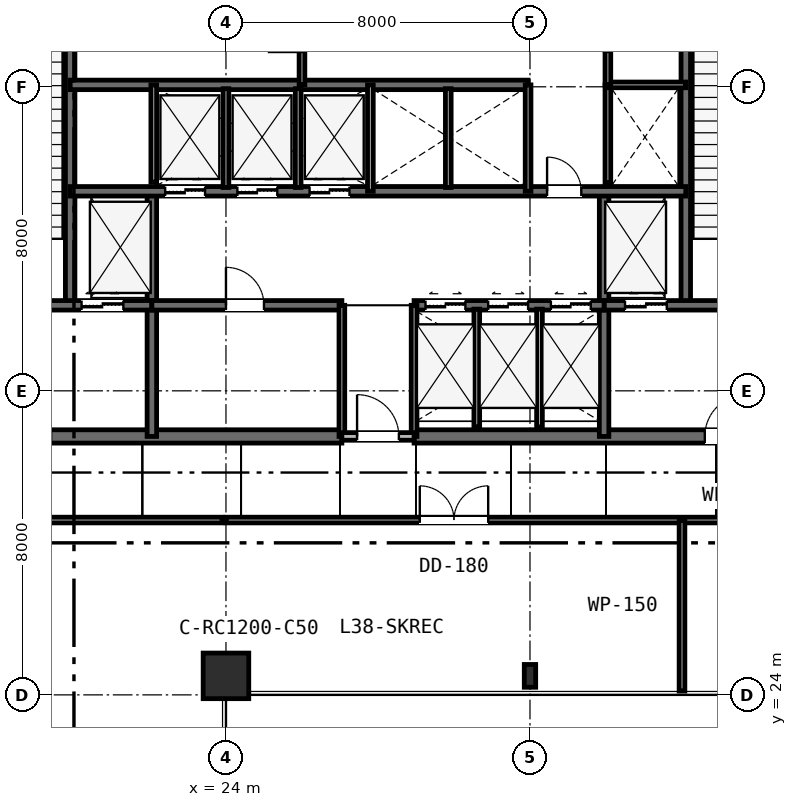
"""IFC4 building model, lengths in metres.
Left out: names, types, materials, properties, quantities, classifications, styles, units other than length and angle.
Written with IfcOpenShell. Run it as: python <this file> out.ifc"""

import sys

from ifc_helpers import new_model, si_unit, direction, frame, frame_2d, origin, origin_2d, place, context, subcontext, project, spatial, rectangle, i_section, extrude, element, fill, save


model = new_model("IFC4")
c1 = context("Model", 3, precision=1e-05, world=origin(), true_north=direction((0.0, 1.0)))
c2 = subcontext(c1, "Body", "Model", "MODEL_VIEW")
j1 = project(units=[si_unit("LENGTHUNIT", "METRE"), si_unit("PLANEANGLEUNIT", "RADIAN")], contexts=[c1])
p1 = place(None, origin())
s1 = spatial("IfcSite", under=j1, at=p1, CompositionType="ELEMENT")
p2 = place(p1, origin())
s2 = spatial("IfcBuilding", under=s1, at=p2, CompositionType="ELEMENT")
p3 = place(p2, frame((0.0, 0.0, 148.8)))
s3 = spatial("IfcBuildingStorey", under=s2, at=p3, CompositionType="ELEMENT", Elevation=148.8)
p4 = place(p3, frame((15.85, 30.8, 0.0), z_axis=(0.0, 0.0, 1.0), x_axis=(1.0, 0.0, 0.0)))
e1 = element("IfcWall", 1, at=p4, inside=s3, PredefinedType="SHEAR", context=c2, shape_type="SweptSolid", body=[
    extrude(rectangle(XDim=11.2, YDim=0.35, at=frame_2d((5.6, 0.0))), origin(), (0.0, 0.0, 1.0), 5.4),
])
p5 = place(p4, frame((2.45, 0.0, 0.0)))
e2 = element("IfcOpeningElement", 2, at=p5, cuts=e1, PredefinedType="OPENING", context=c2, shape_type="SweptSolid", body=[
    extrude(rectangle(XDim=1.1, YDim=2.15, at=frame_2d((0.55, 1.075))), frame((0.0, 0.185, 0.0), z_axis=(0.0, -1.0, 0.0), x_axis=(1.0, 0.0, 0.0)), (0.0, 0.0, 1.0), 0.37),
])
p6 = place(p3, frame((28.95, 30.8, 0.0), z_axis=(0.0, 0.0, 1.0), x_axis=(1.0, 0.0, 0.0)))
e3 = element("IfcWall", 3, at=p6, inside=s3, PredefinedType="SHEAR", context=c2, shape_type="SweptSolid", body=[
    extrude(rectangle(XDim=11.2, YDim=0.35, at=frame_2d((5.6, 0.0))), origin(), (0.0, 0.0, 1.0), 5.4),
])
p7 = place(p6, frame((7.65, 0.0, 0.0)))
e4 = element("IfcOpeningElement", 4, at=p7, cuts=e3, PredefinedType="OPENING", context=c2, shape_type="SweptSolid", body=[
    extrude(rectangle(XDim=1.1, YDim=2.15, at=frame_2d((0.55, 1.075))), frame((0.0, 0.185, 0.0), z_axis=(0.0, -1.0, 0.0), x_axis=(1.0, 0.0, 0.0)), (0.0, 0.0, 1.0), 0.37),
])
for number, where, z_axis, x_axis in (
    (5, (19.9, 34.25, 0.0), (0.0, 0.0, 1.0), (0.0, 1.0, 0.0)),
    (6, (36.1, 34.25, 0.0), (0.0, 0.0, 1.0), (0.0, 1.0, 0.0)),
):
    element("IfcWall", number, at=place(p3, frame(where, z_axis=z_axis, x_axis=x_axis)), inside=s3, PredefinedType="SHEAR", context=c2, shape_type="SweptSolid", body=[
        extrude(rectangle(XDim=8.65, YDim=0.25, at=frame_2d((4.325, 0.0))), origin(), (0.0, 0.0, 1.0), 5.4),
    ])
for number, where, z_axis, x_axis in (
    (7, (22.05, 30.8, 0.0), (0.0, 0.0, 1.0), (0.0, 1.0, 0.0)),
    (8, (33.95, 30.8, 0.0), (0.0, 0.0, 1.0), (0.0, 1.0, 0.0)),
):
    element("IfcWall", number, at=place(p3, frame(where, z_axis=z_axis, x_axis=x_axis)), inside=s3, PredefinedType="SHEAR", context=c2, shape_type="SweptSolid", body=[
        extrude(rectangle(XDim=6.45, YDim=0.25, at=frame_2d((3.225, 0.0))), origin(), (0.0, 0.0, 1.0), 5.4),
    ])
p8 = place(p3, frame((16.0, 34.25, 0.0), z_axis=(0.0, 0.0, 1.0), x_axis=(1.0, 0.0, 0.0)))
e9 = element("IfcWall", 9, at=p8, inside=s3, PredefinedType="SHEAR", context=c2, shape_type="SweptSolid", body=[
    extrude(rectangle(XDim=6.05, YDim=0.25, at=frame_2d((3.025, 0.0))), origin(), (0.0, 0.0, 1.0), 5.4),
])
p9 = place(p8, frame((1.25, 0.0, 0.0)))
e10 = element("IfcOpeningElement", 10, at=p9, cuts=e9, PredefinedType="OPENING", context=c2, shape_type="SweptSolid", body=[
    extrude(rectangle(XDim=1.0, YDim=2.15, at=frame_2d((0.5, 1.075))), frame((0.0, 0.135, 0.0), z_axis=(0.0, -1.0, 0.0), x_axis=(1.0, 0.0, 0.0)), (0.0, 0.0, 1.0), 0.27),
])
p10 = place(p8, frame((4.2, 0.0, 0.0)))
e11 = element("IfcOpeningElement", 11, at=p10, cuts=e9, PredefinedType="OPENING", context=c2, shape_type="SweptSolid", body=[
    extrude(rectangle(XDim=1.1, YDim=2.15, at=frame_2d((0.55, 1.075))), frame((0.0, 0.135, 0.0), z_axis=(0.0, -1.0, 0.0), x_axis=(1.0, 0.0, 0.0)), (0.0, 0.0, 1.0), 0.27),
])
p11 = place(p3, frame((33.95, 34.25, 0.0), z_axis=(0.0, 0.0, 1.0), x_axis=(1.0, 0.0, 0.0)))
e12 = element("IfcWall", 12, at=p11, inside=s3, PredefinedType="SHEAR", context=c2, shape_type="SweptSolid", body=[
    extrude(rectangle(XDim=6.05, YDim=0.25, at=frame_2d((3.025, 0.0))), origin(), (0.0, 0.0, 1.0), 5.4),
])
p12 = place(p11, frame((3.7, 0.0, 0.0)))
e13 = element("IfcOpeningElement", 13, at=p12, cuts=e12, PredefinedType="OPENING", context=c2, shape_type="SweptSolid", body=[
    extrude(rectangle(XDim=1.0, YDim=2.15, at=frame_2d((0.5, 1.075))), frame((0.0, 0.135, 0.0), z_axis=(0.0, -1.0, 0.0), x_axis=(1.0, 0.0, 0.0)), (0.0, 0.0, 1.0), 0.27),
])
p13 = place(p11, frame((0.55, 0.0, 0.0)))
e14 = element("IfcOpeningElement", 14, at=p13, cuts=e12, PredefinedType="OPENING", context=c2, shape_type="SweptSolid", body=[
    extrude(rectangle(XDim=1.1, YDim=2.15, at=frame_2d((0.55, 1.075))), frame((0.0, 0.135, 0.0), z_axis=(0.0, -1.0, 0.0), x_axis=(1.0, 0.0, 0.0)), (0.0, 0.0, 1.0), 0.27),
])
p14 = place(p3, frame((22.05, 34.25, 0.0), z_axis=(0.0, 0.0, 1.0), x_axis=(1.0, 0.0, 0.0)))
e15 = element("IfcWall", 15, at=p14, inside=s3, PredefinedType="SHEAR", context=c2, shape_type="SweptSolid", body=[
    extrude(rectangle(XDim=5.0, YDim=0.25, at=frame_2d((2.5, 0.0))), origin(), (0.0, 0.0, 1.0), 5.4),
])
p15 = place(p14, frame((1.95, 0.0, 0.0)))
e16 = element("IfcOpeningElement", 16, at=p15, cuts=e15, PredefinedType="OPENING", context=c2, shape_type="SweptSolid", body=[
    extrude(rectangle(XDim=1.0, YDim=2.15, at=frame_2d((0.5, 1.075))), frame((0.0, 0.135, 0.0), z_axis=(0.0, -1.0, 0.0), x_axis=(1.0, 0.0, 0.0)), (0.0, 0.0, 1.0), 0.27),
])
p16 = place(p3, frame((28.95, 34.25, 0.0), z_axis=(0.0, 0.0, 1.0), x_axis=(1.0, 0.0, 0.0)))
e17 = element("IfcWall", 17, at=p16, inside=s3, PredefinedType="SHEAR", context=c2, shape_type="SweptSolid", body=[
    extrude(rectangle(XDim=5.0, YDim=0.25, at=frame_2d((2.5, 0.0))), origin(), (0.0, 0.0, 1.0), 5.4),
])
p17 = place(p16, frame((0.3, 0.0, 0.0)))
e18 = element("IfcOpeningElement", 18, at=p17, cuts=e17, PredefinedType="OPENING", context=c2, shape_type="SweptSolid", body=[
    extrude(rectangle(XDim=1.05, YDim=2.15, at=frame_2d((0.525, 1.075))), frame((0.0, 0.135, 0.0), z_axis=(0.0, -1.0, 0.0), x_axis=(1.0, 0.0, 0.0)), (0.0, 0.0, 1.0), 0.27),
])
p18 = place(p16, frame((1.95, 0.0, 0.0)))
e19 = element("IfcOpeningElement", 19, at=p18, cuts=e17, PredefinedType="OPENING", context=c2, shape_type="SweptSolid", body=[
    extrude(rectangle(XDim=1.05, YDim=2.15, at=frame_2d((0.525, 1.075))), frame((0.0, 0.135, 0.0), z_axis=(0.0, -1.0, 0.0), x_axis=(1.0, 0.0, 0.0)), (0.0, 0.0, 1.0), 0.27),
])
p19 = place(p16, frame((3.6, 0.0, 0.0)))
e20 = element("IfcOpeningElement", 20, at=p19, cuts=e17, PredefinedType="OPENING", context=c2, shape_type="SweptSolid", body=[
    extrude(rectangle(XDim=1.05, YDim=2.15, at=frame_2d((0.525, 1.075))), frame((0.0, 0.135, 0.0), z_axis=(0.0, -1.0, 0.0), x_axis=(1.0, 0.0, 0.0)), (0.0, 0.0, 1.0), 0.27),
])
p20 = place(p3, frame((19.9, 37.25, 0.0), z_axis=(0.0, 0.0, 1.0), x_axis=(1.0, 0.0, 0.0)))
e21 = element("IfcWall", 21, at=p20, inside=s3, PredefinedType="SHEAR", context=c2, shape_type="SweptSolid", body=[
    extrude(rectangle(XDim=16.2, YDim=0.25, at=frame_2d((8.1, 0.0))), origin(), (0.0, 0.0, 1.0), 5.4),
])
p21 = place(p20, frame((12.55, 0.0, 0.0)))
e22 = element("IfcOpeningElement", 22, at=p21, cuts=e21, PredefinedType="OPENING", context=c2, shape_type="SweptSolid", body=[
    extrude(rectangle(XDim=0.9, YDim=2.15, at=frame_2d((0.45, 1.075))), frame((0.0, 0.135, 0.0), z_axis=(0.0, -1.0, 0.0), x_axis=(1.0, 0.0, 0.0)), (0.0, 0.0, 1.0), 0.27),
])
p22 = place(p20, frame((2.5, 0.0, 0.0)))
e23 = element("IfcOpeningElement", 23, at=p22, cuts=e21, PredefinedType="OPENING", context=c2, shape_type="SweptSolid", body=[
    extrude(rectangle(XDim=1.05, YDim=2.15, at=frame_2d((0.525, 1.075))), frame((0.0, 0.135, 0.0), z_axis=(0.0, -1.0, 0.0), x_axis=(1.0, 0.0, 0.0)), (0.0, 0.0, 1.0), 0.27),
])
p23 = place(p20, frame((4.4, 0.0, 0.0)))
e24 = element("IfcOpeningElement", 24, at=p23, cuts=e21, PredefinedType="OPENING", context=c2, shape_type="SweptSolid", body=[
    extrude(rectangle(XDim=1.05, YDim=2.15, at=frame_2d((0.525, 1.075))), frame((0.0, 0.135, 0.0), z_axis=(0.0, -1.0, 0.0), x_axis=(1.0, 0.0, 0.0)), (0.0, 0.0, 1.0), 0.27),
])
p24 = place(p20, frame((6.3, 0.0, 0.0)))
e25 = element("IfcOpeningElement", 25, at=p24, cuts=e21, PredefinedType="OPENING", context=c2, shape_type="SweptSolid", body=[
    extrude(rectangle(XDim=1.05, YDim=2.15, at=frame_2d((0.525, 1.075))), frame((0.0, 0.135, 0.0), z_axis=(0.0, -1.0, 0.0), x_axis=(1.0, 0.0, 0.0)), (0.0, 0.0, 1.0), 0.27),
])
p25 = place(p3, frame((19.9, 40.05, 0.0), z_axis=(0.0, 0.0, 1.0), x_axis=(1.0, 0.0, 0.0)))
e26 = element("IfcWall", 26, at=p25, inside=s3, PredefinedType="SHEAR", context=c2, shape_type="SweptSolid", body=[
    extrude(rectangle(XDim=12.05, YDim=0.25, at=frame_2d((6.025, 0.0))), origin(), (0.0, 0.0, 1.0), 5.4),
])
p26 = place(p3, frame((24.0, 24.5, 0.0), z_axis=(0.0, 0.0, 1.0), x_axis=(1.0, 0.0, 0.0)))
e27 = element("IfcColumn", 27, at=p26, inside=s3, PredefinedType="COLUMN", context=c2, shape_type="SweptSolid", body=[
    extrude(rectangle(XDim=1.2, YDim=1.2, at=origin_2d()), origin(), (0.0, 0.0, 1.0), 5.4),
])
p27 = place(p3, frame((32.0, 24.5, 0.0), z_axis=(0.0, 0.0, 1.0), x_axis=(1.0, 0.0, 0.0)))
e28 = element("IfcColumn", 28, at=p27, inside=s3, PredefinedType="COLUMN", context=c2, shape_type="SweptSolid", body=[
    extrude(i_section(OverallWidth=0.3, OverallDepth=0.6, WebThickness=0.015, FlangeThickness=0.03, FilletRadius=0.027, at=origin_2d()), origin(), (0.0, 0.0, 1.0), 5.4),
])
p28 = place(p3, frame((27.05, 30.8, 0.0), z_axis=(0.0, 0.0, 1.0), x_axis=(0.0, 1.0, 0.0)))
e29 = element("IfcWall", 29, at=p28, inside=s3, PredefinedType="PLUMBINGWALL", context=c2, shape_type="SweptSolid", body=[
    extrude(rectangle(XDim=3.45, YDim=0.15, at=frame_2d((1.725, 0.0))), origin(), (0.0, 0.0, 1.0), 4.76),
])
p29 = place(p3, frame((28.95, 30.8, 0.0), z_axis=(0.0, 0.0, 1.0), x_axis=(0.0, 1.0, 0.0)))
e30 = element("IfcWall", 30, at=p29, inside=s3, PredefinedType="PLUMBINGWALL", context=c2, shape_type="SweptSolid", body=[
    extrude(rectangle(XDim=3.45, YDim=0.15, at=frame_2d((1.725, 0.0))), origin(), (0.0, 0.0, 1.0), 5.13),
])
p30 = place(p3, frame((27.05, 30.8, 0.0), z_axis=(0.0, 0.0, 1.0), x_axis=(1.0, 0.0, 0.0)))
e31 = element("IfcWall", 31, at=p30, inside=s3, PredefinedType="PARTITIONING", context=c2, shape_type="SweptSolid", body=[
    extrude(rectangle(XDim=1.9, YDim=0.2, at=frame_2d((0.95, 0.0))), origin(), (0.0, 0.0, 1.0), 4.76),
])
p31 = place(p30, frame((0.4, 0.0, 0.0)))
e32 = element("IfcOpeningElement", 32, at=p31, cuts=e31, PredefinedType="OPENING", context=c2, shape_type="SweptSolid", body=[
    extrude(rectangle(XDim=1.1, YDim=2.15, at=frame_2d((0.55, 1.075))), frame((0.0, 0.11, 0.0), z_axis=(0.0, -1.0, 0.0), x_axis=(1.0, 0.0, 0.0)), (0.0, 0.0, 1.0), 0.22),
])
for number, where, z_axis, x_axis in (
    (33, (30.6, 31.05, 0.0), (0.0, 0.0, 1.0), (0.0, 1.0, 0.0)),
    (34, (32.25, 31.05, 0.0), (0.0, 0.0, 1.0), (0.0, 1.0, 0.0)),
):
    element("IfcWall", number, at=place(p3, frame(where, z_axis=z_axis, x_axis=x_axis)), inside=s3, PredefinedType="PLUMBINGWALL", context=c2, shape_type="SweptSolid", body=[
        extrude(rectangle(XDim=3.1, YDim=0.15, at=frame_2d((1.55, 0.0))), origin(), (0.0, 0.0, 1.0), 5.13),
    ])
p32 = place(p3, frame((22.1, 37.49, 0.0), z_axis=(0.0, 0.0, 1.0), x_axis=(0.0, 1.0, 0.0)))
e35 = element("IfcWall", 35, at=p32, inside=s3, PredefinedType="PLUMBINGWALL", context=c2, shape_type="SweptSolid", body=[
    extrude(rectangle(XDim=2.56, YDim=0.15, at=frame_2d((1.28, 0.0))), origin(), (0.0, 0.0, 1.0), 5.13),
])
p33 = place(p3, frame((27.8, 37.25, 0.0), z_axis=(0.0, 0.0, 1.0), x_axis=(0.0, 1.0, 0.0)))
e36 = element("IfcWall", 36, at=p33, inside=s3, PredefinedType="PLUMBINGWALL", context=c2, shape_type="SweptSolid", body=[
    extrude(rectangle(XDim=2.8, YDim=0.15, at=frame_2d((1.4, 0.0))), origin(), (0.0, 0.0, 1.0), 5.13),
])
for number, where, z_axis, x_axis in (
    (37, (24.0, 37.35, 0.0), (0.0, 0.0, 1.0), (0.0, 1.0, 0.0)),
    (38, (25.9, 37.35, 0.0), (0.0, 0.0, 1.0), (0.0, 1.0, 0.0)),
):
    element("IfcWall", number, at=place(p3, frame(where, z_axis=z_axis, x_axis=x_axis)), inside=s3, PredefinedType="PLUMBINGWALL", context=c2, shape_type="SweptSolid", body=[
        extrude(rectangle(XDim=2.6, YDim=0.15, at=frame_2d((1.3, 0.0))), origin(), (0.0, 0.0, 1.0), 5.13),
    ])
p34 = place(p3, frame((31.95, 37.25, 0.0), z_axis=(0.0, 0.0, 1.0), x_axis=(0.0, 1.0, 0.0)))
e39 = element("IfcWall", 39, at=p34, inside=s3, PredefinedType="PLUMBINGWALL", context=c2, shape_type="SweptSolid", body=[
    extrude(rectangle(XDim=2.8, YDim=0.15, at=frame_2d((1.4, 0.0))), origin(), (0.0, 0.0, 1.0), 5.13),
])
p35 = place(p3, frame((29.85, 37.35, 0.0), z_axis=(0.0, 0.0, 1.0), x_axis=(0.0, 1.0, 0.0)))
e40 = element("IfcWall", 40, at=p35, inside=s3, PredefinedType="PLUMBINGWALL", context=c2, shape_type="SweptSolid", body=[
    extrude(rectangle(XDim=2.6, YDim=0.15, at=frame_2d((1.3, 0.0))), origin(), (0.0, 0.0, 1.0), 5.13),
])
p36 = place(p3, frame((34.05, 37.473, 0.0), z_axis=(0.0, 0.0, 1.0), x_axis=(0.0, 1.0, 0.0)))
e41 = element("IfcWall", 41, at=p36, inside=s3, PredefinedType="PLUMBINGWALL", context=c2, shape_type="SweptSolid", body=[
    extrude(rectangle(XDim=2.577, YDim=0.15, at=frame_2d((1.288, 0.0))), origin(), (0.0, 0.0, 1.0), 5.13),
])
p37 = place(p3, frame((34.05, 40.05, 0.0), z_axis=(0.0, 0.0, 1.0), x_axis=(1.0, 0.0, 0.0)))
e42 = element("IfcWall", 42, at=p37, inside=s3, PredefinedType="PARTITIONING", context=c2, shape_type="SweptSolid", body=[
    extrude(rectangle(XDim=2.05, YDim=0.15, at=frame_2d((1.025, 0.0))), origin(), (0.0, 0.0, 1.0), 5.13),
])
p38 = place(p3, frame((34.05, 40.05, 0.0), z_axis=(0.0, 0.0, 1.0), x_axis=(0.0, 1.0, 0.0)))
e43 = element("IfcWall", 43, at=p38, inside=s3, PredefinedType="PARTITIONING", context=c2, shape_type="SweptSolid", body=[
    extrude(rectangle(XDim=2.85, YDim=0.15, at=frame_2d((1.425, 0.0))), origin(), (0.0, 0.0, 1.0), 5.13),
])
p39 = place(p38, frame((0.865, 0.0, 0.0)))
e44 = element("IfcOpeningElement", 44, at=p39, cuts=e43, PredefinedType="OPENING", context=c2, shape_type="SweptSolid", body=[
    extrude(rectangle(XDim=0.9, YDim=2.15, at=frame_2d((0.45, 1.075))), frame((0.0, 0.085, 0.0), z_axis=(0.0, -1.0, 0.0), x_axis=(1.0, 0.0, 0.0)), (0.0, 0.0, 1.0), 0.17),
])
p40 = place(p3, frame((26.0, 40.05, 0.0), z_axis=(0.0, 0.0, 1.0), x_axis=(0.0, 1.0, 0.0)))
e45 = element("IfcWall", 45, at=p40, inside=s3, PredefinedType="PARTITIONING", context=c2, shape_type="SweptSolid", body=[
    extrude(rectangle(XDim=2.85, YDim=0.15, at=frame_2d((1.425, 0.0))), origin(), (0.0, 0.0, 1.0), 5.13),
])
p41 = place(p40, frame((0.865, 0.0, 0.0)))
e46 = element("IfcOpeningElement", 46, at=p41, cuts=e45, PredefinedType="OPENING", context=c2, shape_type="SweptSolid", body=[
    extrude(rectangle(XDim=0.9, YDim=2.15, at=frame_2d((0.45, 1.075))), frame((0.0, 0.085, 0.0), z_axis=(0.0, -1.0, 0.0), x_axis=(1.0, 0.0, 0.0)), (0.0, 0.0, 1.0), 0.17),
])
p42 = place(p3, frame((24.0, 28.6, 0.0), z_axis=(0.0, 0.0, 1.0), x_axis=(1.0, 0.0, 0.0)))
e47 = element("IfcWall", 47, at=p42, inside=s3, PredefinedType="PARTITIONING", context=c2, shape_type="SweptSolid", body=[
    extrude(rectangle(XDim=26.9, YDim=0.15, at=frame_2d((13.45, 0.0))), origin(), (0.0, 0.0, 1.0), 4.73),
])
p43 = place(p42, frame((5.1, 0.0, 0.0)))
e48 = element("IfcOpeningElement", 48, at=p43, cuts=e47, PredefinedType="OPENING", context=c2, shape_type="SweptSolid", body=[
    extrude(rectangle(XDim=1.8, YDim=2.15, at=frame_2d((0.9, 1.075))), frame((0.0, 0.085, 0.0), z_axis=(0.0, -1.0, 0.0), x_axis=(1.0, 0.0, 0.0)), (0.0, 0.0, 1.0), 0.17),
])
p44 = place(p42, frame((17.099, 0.0, 0.0)))
e49 = element("IfcOpeningElement", 49, at=p44, cuts=e47, PredefinedType="OPENING", context=c2, shape_type="SweptSolid", body=[
    extrude(rectangle(XDim=1.8, YDim=2.15, at=frame_2d((0.9, 1.075))), frame((0.0, 0.085, 0.0), z_axis=(0.0, -1.0, 0.0), x_axis=(1.0, 0.0, 0.0)), (0.0, 0.0, 1.0), 0.17),
])
p45 = place(p3, frame((36.0, 24.1, 0.0), z_axis=(0.0, 0.0, 1.0), x_axis=(0.0, 1.0, 0.0)))
e50 = element("IfcWall", 50, at=p45, inside=s3, PredefinedType="PARTITIONING", context=c2, shape_type="SweptSolid", body=[
    extrude(rectangle(XDim=4.5, YDim=0.15, at=frame_2d((2.25, 0.0))), origin(), (0.0, 0.0, 1.0), 4.81),
])
p46 = place(p3, frame((5.1, 28.6, 0.0), z_axis=(0.0, 0.0, 1.0), x_axis=(1.0, 0.0, 0.0)))
e51 = element("IfcWall", 51, at=p46, inside=s3, PredefinedType="PARTITIONING", context=c2, shape_type="SweptSolid", body=[
    extrude(rectangle(XDim=18.8, YDim=0.15, at=frame_2d((9.4, 0.0))), origin(), (0.0, 0.0, 1.0), 4.73),
])
p47 = place(p46, frame((8.5, 0.0, 0.0)))
e52 = element("IfcOpeningElement", 52, at=p47, cuts=e51, PredefinedType="OPENING", context=c2, shape_type="SweptSolid", body=[
    extrude(rectangle(XDim=1.8, YDim=2.15, at=frame_2d((0.9, 1.075))), frame((0.0, 0.085, 0.0), z_axis=(0.0, -1.0, 0.0), x_axis=(1.0, 0.0, 0.0)), (0.0, 0.0, 1.0), 0.17),
])
p48 = place(p31, origin())
e53 = element("IfcDoor", 53, at=p48, inside=s3, OperationType="SINGLE_SWING_LEFT", PredefinedType="DOOR", context=c2, shape_type="SweptSolid", body=[
    extrude(rectangle(XDim=1.1, YDim=2.15, at=frame_2d((0.55, 1.075))), frame((0.0, 0.025, 0.0), z_axis=(0.0, -1.0, 0.0), x_axis=(1.0, 0.0, 0.0)), (0.0, 0.0, 1.0), 0.05),
])
fill(e32, e53)
p49 = place(p7, origin())
e54 = element("IfcDoor", 54, at=p49, inside=s3, OperationType="SINGLE_SWING_RIGHT", PredefinedType="DOOR", context=c2, shape_type="SweptSolid", body=[
    extrude(rectangle(XDim=1.1, YDim=2.15, at=frame_2d((0.55, 1.075))), frame((0.0, 0.025, 0.0), z_axis=(0.0, -1.0, 0.0), x_axis=(1.0, 0.0, 0.0)), (0.0, 0.0, 1.0), 0.05),
])
fill(e4, e54)
p50 = place(p15, origin())
e55 = element("IfcDoor", 55, at=p50, inside=s3, OperationType="SINGLE_SWING_LEFT", PredefinedType="DOOR", context=c2, shape_type="SweptSolid", body=[
    extrude(rectangle(XDim=1.0, YDim=2.15, at=frame_2d((0.5, 1.075))), frame((0.0, 0.025, 0.0), z_axis=(0.0, -1.0, 0.0), x_axis=(1.0, 0.0, 0.0)), (0.0, 0.0, 1.0), 0.05),
])
fill(e16, e55)
p51 = place(p21, origin())
e56 = element("IfcDoor", 56, at=p51, inside=s3, OperationType="SINGLE_SWING_LEFT", PredefinedType="DOOR", context=c2, shape_type="SweptSolid", body=[
    extrude(rectangle(XDim=0.9, YDim=2.15, at=frame_2d((0.45, 1.075))), frame((0.0, 0.025, 0.0), z_axis=(0.0, -1.0, 0.0), x_axis=(1.0, 0.0, 0.0)), (0.0, 0.0, 1.0), 0.05),
])
fill(e22, e56)
p52 = place(p43, origin())
e57 = element("IfcDoor", 57, at=p52, inside=s3, OperationType="DOUBLE_DOOR_SINGLE_SWING", PredefinedType="DOOR", context=c2, shape_type="SweptSolid", body=[
    extrude(rectangle(XDim=1.8, YDim=2.15, at=frame_2d((0.9, 1.075))), frame((0.0, 0.025, 0.0), z_axis=(0.0, -1.0, 0.0), x_axis=(1.0, 0.0, 0.0)), (0.0, 0.0, 1.0), 0.05),
])
fill(e48, e57)
p53 = place(p10, origin())
e58 = element("IfcDoor", 58, at=p53, inside=s3, OperationType="DOUBLE_DOOR_SLIDING", PredefinedType="DOOR", context=c2, shape_type="SweptSolid", body=[
    extrude(rectangle(XDim=1.1, YDim=2.15, at=frame_2d((0.55, 1.075))), frame((0.0, 0.025, 0.0), z_axis=(0.0, -1.0, 0.0), x_axis=(1.0, 0.0, 0.0)), (0.0, 0.0, 1.0), 0.05),
])
fill(e11, e58)
p54 = place(p13, origin())
e59 = element("IfcDoor", 59, at=p54, inside=s3, OperationType="DOUBLE_DOOR_SLIDING", PredefinedType="DOOR", context=c2, shape_type="SweptSolid", body=[
    extrude(rectangle(XDim=1.1, YDim=2.15, at=frame_2d((0.55, 1.075))), frame((0.0, 0.025, 0.0), z_axis=(0.0, -1.0, 0.0), x_axis=(1.0, 0.0, 0.0)), (0.0, 0.0, 1.0), 0.05),
])
fill(e14, e59)
p55 = place(p17, origin())
e60 = element("IfcDoor", 60, at=p55, inside=s3, OperationType="DOUBLE_DOOR_SLIDING", PredefinedType="DOOR", context=c2, shape_type="SweptSolid", body=[
    extrude(rectangle(XDim=1.05, YDim=2.15, at=frame_2d((0.525, 1.075))), frame((0.0, 0.025, 0.0), z_axis=(0.0, -1.0, 0.0), x_axis=(1.0, 0.0, 0.0)), (0.0, 0.0, 1.0), 0.05),
])
fill(e18, e60)
p56 = place(p18, origin())
e61 = element("IfcDoor", 61, at=p56, inside=s3, OperationType="DOUBLE_DOOR_SLIDING", PredefinedType="DOOR", context=c2, shape_type="SweptSolid", body=[
    extrude(rectangle(XDim=1.05, YDim=2.15, at=frame_2d((0.525, 1.075))), frame((0.0, 0.025, 0.0), z_axis=(0.0, -1.0, 0.0), x_axis=(1.0, 0.0, 0.0)), (0.0, 0.0, 1.0), 0.05),
])
fill(e19, e61)
p57 = place(p19, origin())
e62 = element("IfcDoor", 62, at=p57, inside=s3, OperationType="DOUBLE_DOOR_SLIDING", PredefinedType="DOOR", context=c2, shape_type="SweptSolid", body=[
    extrude(rectangle(XDim=1.05, YDim=2.15, at=frame_2d((0.525, 1.075))), frame((0.0, 0.025, 0.0), z_axis=(0.0, -1.0, 0.0), x_axis=(1.0, 0.0, 0.0)), (0.0, 0.0, 1.0), 0.05),
])
fill(e20, e62)
p58 = place(p22, origin())
e63 = element("IfcDoor", 63, at=p58, inside=s3, OperationType="DOUBLE_DOOR_SLIDING", PredefinedType="DOOR", context=c2, shape_type="SweptSolid", body=[
    extrude(rectangle(XDim=1.05, YDim=2.15, at=frame_2d((0.525, 1.075))), frame((0.0, 0.025, 0.0), z_axis=(0.0, -1.0, 0.0), x_axis=(1.0, 0.0, 0.0)), (0.0, 0.0, 1.0), 0.05),
])
fill(e23, e63)
p59 = place(p23, origin())
e64 = element("IfcDoor", 64, at=p59, inside=s3, OperationType="DOUBLE_DOOR_SLIDING", PredefinedType="DOOR", context=c2, shape_type="SweptSolid", body=[
    extrude(rectangle(XDim=1.05, YDim=2.15, at=frame_2d((0.525, 1.075))), frame((0.0, 0.025, 0.0), z_axis=(0.0, -1.0, 0.0), x_axis=(1.0, 0.0, 0.0)), (0.0, 0.0, 1.0), 0.05),
])
fill(e24, e64)
p60 = place(p24, origin())
e65 = element("IfcDoor", 65, at=p60, inside=s3, OperationType="DOUBLE_DOOR_SLIDING", PredefinedType="DOOR", context=c2, shape_type="SweptSolid", body=[
    extrude(rectangle(XDim=1.05, YDim=2.15, at=frame_2d((0.525, 1.075))), frame((0.0, 0.025, 0.0), z_axis=(0.0, -1.0, 0.0), x_axis=(1.0, 0.0, 0.0)), (0.0, 0.0, 1.0), 0.05),
])
fill(e25, e65)
save(model, sys.argv[1])
